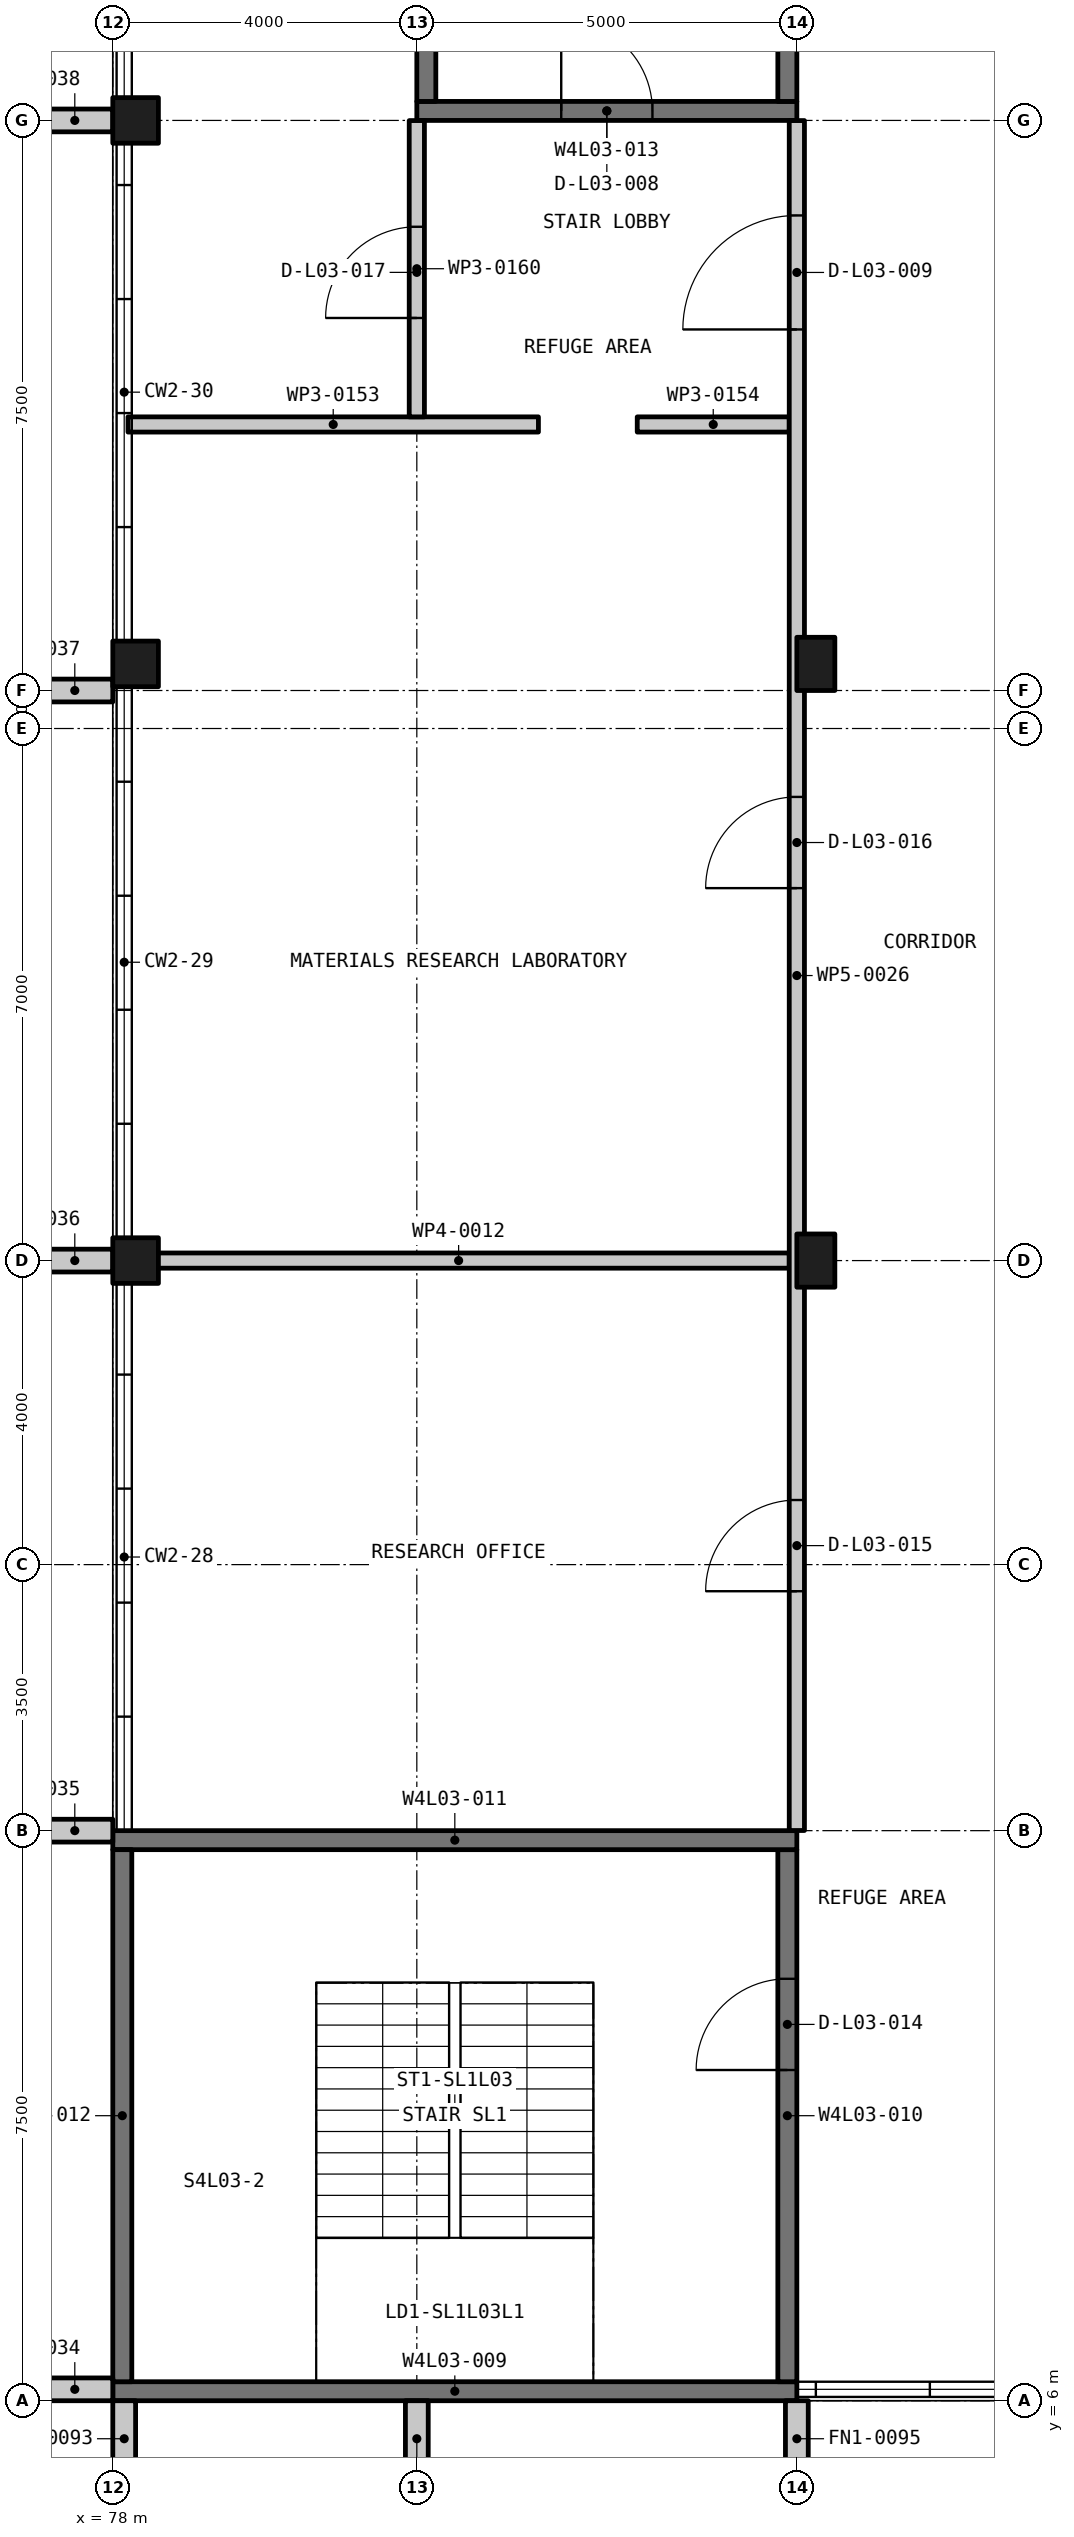
"""IFC4 building model, lengths in metres.
Left out: names, types, materials, properties, quantities, classifications, styles, units other than length and angle.
Written with IfcOpenShell. Run it as: python <this file> out.ifc"""

import sys

from ifc_helpers import new_model, si_unit, direction, frame, frame_2d, origin, origin_2d, place, context, subcontext, project, spatial, rectangle, extrude, element, fill, save


model = new_model("IFC4")
c1 = context("Model", 3, precision=1e-05, world=origin(), true_north=direction((0.0, 1.0)))
c2 = subcontext(c1, "Body", "Model", "MODEL_VIEW")
j1 = project(units=[si_unit("LENGTHUNIT", "METRE"), si_unit("PLANEANGLEUNIT", "RADIAN")], contexts=[c1])
p1 = place(None, origin())
s1 = spatial("IfcSite", under=j1, at=p1, CompositionType="ELEMENT")
p2 = place(p1, origin())
s2 = spatial("IfcBuilding", under=s1, at=p2, CompositionType="ELEMENT")
p3 = place(p2, frame((0.0, 0.0, 15.75)))
s3 = spatial("IfcBuildingStorey", under=s2, at=p3, CompositionType="ELEMENT", Elevation=15.75)
for number, where, z_axis, x_axis in (
    (1, (78.3, 21.0, -0.3), (0.0, 0.0, 1.0), (1.0, 0.0, 0.0)),
    (2, (78.3, 28.85, -0.3), (0.0, 0.0, 1.0), (1.0, 0.0, 0.0)),
    (3, (78.3, 36.0, -0.3), (0.0, 0.0, 1.0), (1.0, 0.0, 0.0)),
):
    element("IfcColumn", number, at=place(p3, frame(where, z_axis=z_axis, x_axis=x_axis)), inside=s3, PredefinedType="COLUMN", context=c2, shape_type="SweptSolid", body=[
        extrude(rectangle(XDim=0.6, YDim=0.6, at=origin_2d()), origin(), (0.0, 0.0, 1.0), 4.5),
    ])
for number, where, z_axis, x_axis in (
    (4, (87.25, 21.0, -0.3), (0.0, 0.0, 1.0), (1.0, 0.0, 0.0)),
    (5, (87.25, 28.85, -0.3), (0.0, 0.0, 1.0), (1.0, 0.0, 0.0)),
):
    element("IfcColumn", number, at=place(p3, frame(where, z_axis=z_axis, x_axis=x_axis)), inside=s3, PredefinedType="COLUMN", context=c2, shape_type="SweptSolid", body=[
        extrude(rectangle(XDim=0.5, YDim=0.7, at=origin_2d()), origin(), (0.0, 0.0, 1.0), 4.5),
    ])
p4 = place(p3, frame((78.0, 6.125, -0.3), z_axis=(0.0, 0.0, 1.0), x_axis=(1.0, 0.0, 0.0)))
e6 = element("IfcWall", 6, at=p4, inside=s3, PredefinedType="SHEAR", context=c2, shape_type="SweptSolid", body=[
    extrude(rectangle(XDim=9.0, YDim=0.25, at=frame_2d((4.5, 0.0))), origin(), (0.0, 0.0, 1.0), 4.5),
])
p5 = place(p3, frame((86.875, 6.25, -0.3), z_axis=(0.0, 0.0, 1.0), x_axis=(0.0, 1.0, 0.0)))
e7 = element("IfcWall", 7, at=p5, inside=s3, PredefinedType="SHEAR", context=c2, shape_type="SweptSolid", body=[
    extrude(rectangle(XDim=7.0, YDim=0.25, at=frame_2d((3.5, 0.0))), origin(), (0.0, 0.0, 1.0), 4.5),
])
p6 = place(p5, frame((4.101, 0.0, 0.3)))
e8 = element("IfcOpeningElement", 8, at=p6, cuts=e7, PredefinedType="OPENING", context=c2, shape_type="SweptSolid", body=[
    extrude(rectangle(XDim=1.2, YDim=2.2, at=frame_2d((0.6, 1.1))), frame((0.0, 0.135, 0.0), z_axis=(0.0, -1.0, 0.0), x_axis=(1.0, 0.0, 0.0)), (0.0, 0.0, 1.0), 0.27),
])
p7 = place(p3, frame((78.0, 13.375, -0.3), z_axis=(0.0, 0.0, 1.0), x_axis=(1.0, 0.0, 0.0)))
e9 = element("IfcWall", 9, at=p7, inside=s3, PredefinedType="SHEAR", context=c2, shape_type="SweptSolid", body=[
    extrude(rectangle(XDim=9.0, YDim=0.25, at=frame_2d((4.5, 0.0))), origin(), (0.0, 0.0, 1.0), 4.5),
])
p8 = place(p3, frame((78.125, 6.25, -0.3), z_axis=(0.0, 0.0, 1.0), x_axis=(0.0, 1.0, 0.0)))
e10 = element("IfcWall", 10, at=p8, inside=s3, PredefinedType="SHEAR", context=c2, shape_type="SweptSolid", body=[
    extrude(rectangle(XDim=7.0, YDim=0.25, at=frame_2d((3.5, 0.0))), origin(), (0.0, 0.0, 1.0), 4.5),
])
p9 = place(p3, frame((82.0, 36.125, -0.3), z_axis=(0.0, 0.0, 1.0), x_axis=(1.0, 0.0, 0.0)))
e11 = element("IfcWall", 11, at=p9, inside=s3, PredefinedType="SHEAR", context=c2, shape_type="SweptSolid", body=[
    extrude(rectangle(XDim=5.0, YDim=0.25, at=frame_2d((2.5, 0.0))), origin(), (0.0, 0.0, 1.0), 4.5),
])
p10 = place(p9, frame((1.9, 0.0, 0.3)))
e12 = element("IfcOpeningElement", 12, at=p10, cuts=e11, PredefinedType="OPENING", context=c2, shape_type="SweptSolid", body=[
    extrude(rectangle(XDim=1.2, YDim=2.2, at=frame_2d((0.6, 1.1))), frame((0.0, 0.135, 0.0), z_axis=(0.0, -1.0, 0.0), x_axis=(1.0, 0.0, 0.0)), (0.0, 0.0, 1.0), 0.27),
])
for number, where, z_axis, x_axis in (
    (13, (86.875, 36.25, -0.3), (0.0, 0.0, 1.0), (0.0, 1.0, 0.0)),
    (14, (82.125, 36.25, -0.3), (0.0, 0.0, 1.0), (0.0, 1.0, 0.0)),
):
    element("IfcWall", number, at=place(p3, frame(where, z_axis=z_axis, x_axis=x_axis)), inside=s3, PredefinedType="SHEAR", context=c2, shape_type="SweptSolid", body=[
        extrude(rectangle(XDim=7.0, YDim=0.25, at=frame_2d((3.5, 0.0))), origin(), (0.0, 0.0, 1.0), 4.5),
    ])
for number, where, z_axis, x_axis in (
    (15, (77.0, 6.15, 0.0), (0.0, 0.0, 1.0), (1.0, 0.0, 0.0)),
    (16, (77.0, 13.5, 0.0), (0.0, 0.0, 1.0), (1.0, 0.0, 0.0)),
    (17, (77.0, 21.0, 0.0), (0.0, 0.0, 1.0), (1.0, 0.0, 0.0)),
    (18, (77.0, 28.5, 0.0), (0.0, 0.0, 1.0), (1.0, 0.0, 0.0)),
    (19, (77.0, 36.0, 0.0), (0.0, 0.0, 1.0), (1.0, 0.0, 0.0)),
    (20, (78.15, 6.0, 0.0), (0.0, 0.0, 1.0), (0.0, -1.0, 0.0)),
    (21, (82.0, 6.0, 0.0), (0.0, 0.0, 1.0), (0.0, -1.0, 0.0)),
    (22, (87.0, 6.0, 0.0), (0.0, 0.0, 1.0), (0.0, -1.0, 0.0)),
):
    element("IfcWall", number, at=place(p3, frame(where, z_axis=z_axis, x_axis=x_axis)), inside=s3, PredefinedType="SOLIDWALL", context=c2, shape_type="SweptSolid", body=[
        extrude(rectangle(XDim=1.0, YDim=0.3, at=frame_2d((0.5, 0.0))), origin(), (0.0, 0.0, 1.0), 4.5),
    ])
p11 = place(p3, frame((78.2, 21.0, 0.0), z_axis=(0.0, 0.0, 1.0), x_axis=(1.0, 0.0, 0.0)))
e23 = element("IfcWall", 23, at=p11, inside=s3, PredefinedType="PARTITIONING", context=c2, shape_type="SweptSolid", body=[
    extrude(rectangle(XDim=8.7, YDim=0.2, at=frame_2d((4.35, 0.0))), origin(), (0.0, 0.0, 1.0), 3.4),
])
p12 = place(p3, frame((78.2, 32.0, 0.0), z_axis=(0.0, 0.0, 1.0), x_axis=(1.0, 0.0, 0.0)))
e24 = element("IfcWall", 24, at=p12, inside=s3, PredefinedType="PARTITIONING", context=c2, shape_type="SweptSolid", body=[
    extrude(rectangle(XDim=5.4, YDim=0.2, at=frame_2d((2.7, 0.0))), origin(), (0.0, 0.0, 1.0), 3.4),
])
p13 = place(p3, frame((84.9, 32.0, 0.0), z_axis=(0.0, 0.0, 1.0), x_axis=(1.0, 0.0, 0.0)))
e25 = element("IfcWall", 25, at=p13, inside=s3, PredefinedType="PARTITIONING", context=c2, shape_type="SweptSolid", body=[
    extrude(rectangle(XDim=2.0, YDim=0.2, at=frame_2d((1.0, 0.0))), origin(), (0.0, 0.0, 1.0), 4.2),
])
p14 = place(p3, frame((87.0, 13.502, 0.0), z_axis=(0.0, 0.0, 1.0), x_axis=(0.0, 1.0, 0.0)))
e26 = element("IfcWall", 26, at=p14, inside=s3, PredefinedType="PARTITIONING", context=c2, shape_type="SweptSolid", body=[
    extrude(rectangle(XDim=22.496, YDim=0.2, at=frame_2d((11.248, 0.0))), origin(), (0.0, 0.0, 1.0), 3.4),
])
p15 = place(p14, frame((19.748, 0.0, 0.0)))
e27 = element("IfcOpeningElement", 27, at=p15, cuts=e26, PredefinedType="OPENING", context=c2, shape_type="SweptSolid", body=[
    extrude(rectangle(XDim=1.5, YDim=2.1, at=frame_2d((0.75, 1.05))), frame((0.0, 0.11, 0.0), z_axis=(0.0, -1.0, 0.0), x_axis=(1.0, 0.0, 0.0)), (0.0, 0.0, 1.0), 0.22),
])
p16 = place(p14, frame((3.148, 0.0, 0.0)))
e28 = element("IfcOpeningElement", 28, at=p16, cuts=e26, PredefinedType="OPENING", context=c2, shape_type="SweptSolid", body=[
    extrude(rectangle(XDim=1.2, YDim=2.1, at=frame_2d((0.6, 1.05))), frame((0.0, 0.11, 0.0), z_axis=(0.0, -1.0, 0.0), x_axis=(1.0, 0.0, 0.0)), (0.0, 0.0, 1.0), 0.22),
])
p17 = place(p14, frame((12.398, 0.0, 0.0)))
e29 = element("IfcOpeningElement", 29, at=p17, cuts=e26, PredefinedType="OPENING", context=c2, shape_type="SweptSolid", body=[
    extrude(rectangle(XDim=1.2, YDim=2.1, at=frame_2d((0.6, 1.05))), frame((0.0, 0.11, 0.0), z_axis=(0.0, -1.0, 0.0), x_axis=(1.0, 0.0, 0.0)), (0.0, 0.0, 1.0), 0.22),
])
p18 = place(p3, frame((82.0, 32.1, 0.0), z_axis=(0.0, 0.0, 1.0), x_axis=(0.0, 1.0, 0.0)))
e30 = element("IfcWall", 30, at=p18, inside=s3, PredefinedType="PARTITIONING", context=c2, shape_type="SweptSolid", body=[
    extrude(rectangle(XDim=3.898, YDim=0.2, at=frame_2d((1.949, 0.0))), origin(), (0.0, 0.0, 1.0), 3.4),
])
p19 = place(p18, frame((1.301, 0.0, 0.0)))
e31 = element("IfcOpeningElement", 31, at=p19, cuts=e30, PredefinedType="OPENING", context=c2, shape_type="SweptSolid", body=[
    extrude(rectangle(XDim=1.2, YDim=2.1, at=frame_2d((0.6, 1.05))), frame((0.0, 0.11, 0.0), z_axis=(0.0, -1.0, 0.0), x_axis=(1.0, 0.0, 0.0)), (0.0, 0.0, 1.0), 0.22),
])
p20 = place(p10, origin())
e32 = element("IfcDoor", 32, at=p20, inside=s3, OperationType="SINGLE_SWING_LEFT", PredefinedType="DOOR", context=c2, shape_type="SweptSolid", body=[
    extrude(rectangle(XDim=1.2, YDim=2.2, at=frame_2d((0.6, 1.1))), frame((0.0, 0.025, 0.0), z_axis=(0.0, -1.0, 0.0), x_axis=(1.0, 0.0, 0.0)), (0.0, 0.0, 1.0), 0.05),
])
fill(e12, e32)
p21 = place(p15, origin())
e33 = element("IfcDoor", 33, at=p21, inside=s3, OperationType="DOUBLE_DOOR_SINGLE_SWING", PredefinedType="DOOR", context=c2, shape_type="SweptSolid", body=[
    extrude(rectangle(XDim=1.5, YDim=2.1, at=frame_2d((0.75, 1.05))), frame((0.0, 0.025, 0.0), z_axis=(0.0, -1.0, 0.0), x_axis=(1.0, 0.0, 0.0)), (0.0, 0.0, 1.0), 0.05),
])
fill(e27, e33)
p22 = place(p6, origin())
e34 = element("IfcDoor", 34, at=p22, inside=s3, OperationType="SINGLE_SWING_LEFT", PredefinedType="DOOR", context=c2, shape_type="SweptSolid", body=[
    extrude(rectangle(XDim=1.2, YDim=2.2, at=frame_2d((0.6, 1.1))), frame((0.0, 0.025, 0.0), z_axis=(0.0, -1.0, 0.0), x_axis=(1.0, 0.0, 0.0)), (0.0, 0.0, 1.0), 0.05),
])
fill(e8, e34)
p23 = place(p16, origin())
e35 = element("IfcDoor", 35, at=p23, inside=s3, OperationType="SINGLE_SWING_RIGHT", PredefinedType="DOOR", context=c2, shape_type="SweptSolid", body=[
    extrude(rectangle(XDim=1.2, YDim=2.1, at=frame_2d((0.6, 1.05))), frame((0.0, 0.025, 0.0), z_axis=(0.0, -1.0, 0.0), x_axis=(1.0, 0.0, 0.0)), (0.0, 0.0, 1.0), 0.05),
])
fill(e28, e35)
p24 = place(p17, origin())
e36 = element("IfcDoor", 36, at=p24, inside=s3, OperationType="SINGLE_SWING_LEFT", PredefinedType="DOOR", context=c2, shape_type="SweptSolid", body=[
    extrude(rectangle(XDim=1.2, YDim=2.1, at=frame_2d((0.6, 1.05))), frame((0.0, 0.025, 0.0), z_axis=(0.0, -1.0, 0.0), x_axis=(1.0, 0.0, 0.0)), (0.0, 0.0, 1.0), 0.05),
])
fill(e29, e36)
p25 = place(p19, origin())
e37 = element("IfcDoor", 37, at=p25, inside=s3, OperationType="SINGLE_SWING_RIGHT", PredefinedType="DOOR", context=c2, shape_type="SweptSolid", body=[
    extrude(rectangle(XDim=1.2, YDim=2.1, at=frame_2d((0.6, 1.05))), frame((0.0, 0.025, 0.0), z_axis=(0.0, -1.0, 0.0), x_axis=(1.0, 0.0, 0.0)), (0.0, 0.0, 1.0), 0.05),
])
fill(e31, e37)
save(model, sys.argv[1])
